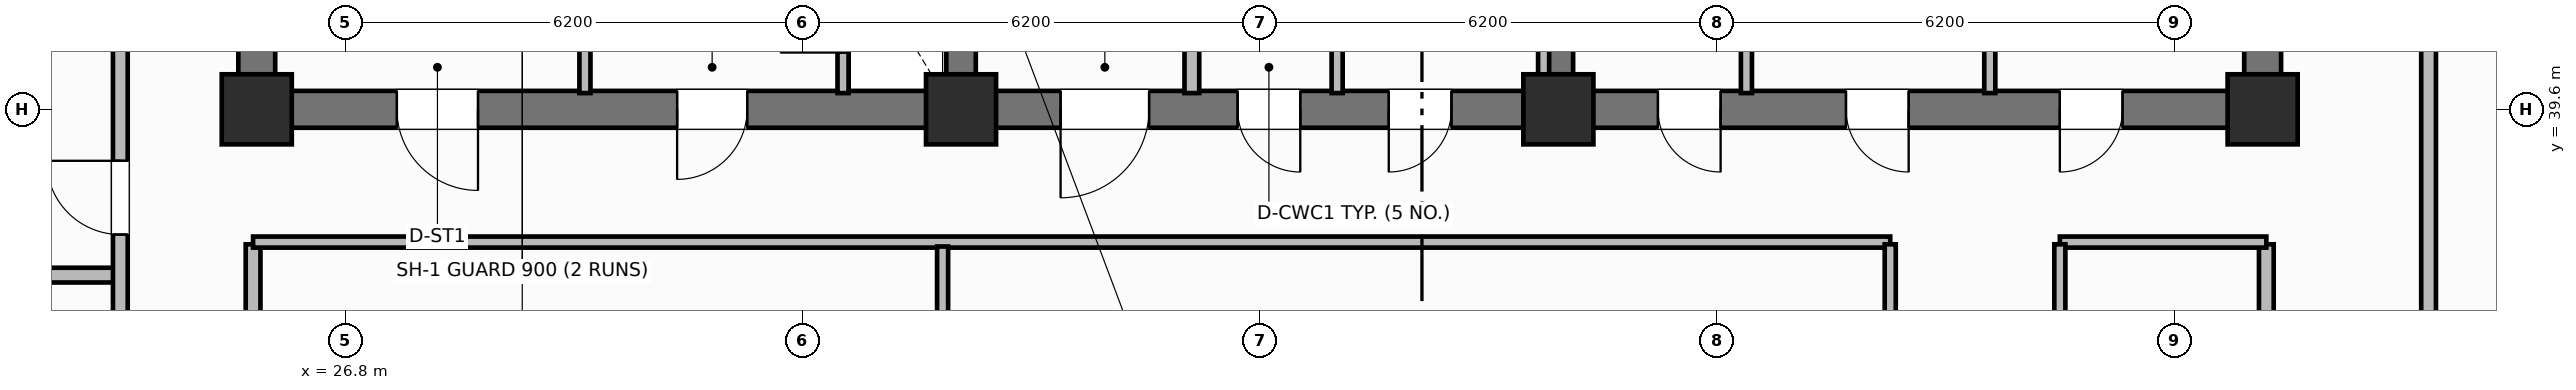
"""IFC4 building model, lengths in metres.
Left out: names, types, materials, properties, quantities, classifications, styles, units other than length and angle.
Written with IfcOpenShell. Run it as: python <this file> out.ifc"""

import sys

from ifc_helpers import new_model, si_unit, direction, frame, frame_2d, origin, origin_2d, place, context, subcontext, project, spatial, rectangle, extrude, element, fill, save


model = new_model("IFC4")
c1 = context("Model", 3, precision=1e-05, world=origin(), true_north=direction((0.0, 1.0)))
c2 = subcontext(c1, "Body", "Model", "MODEL_VIEW")
j1 = project(units=[si_unit("LENGTHUNIT", "METRE"), si_unit("PLANEANGLEUNIT", "RADIAN")], contexts=[c1])
p1 = place(None, origin())
s1 = spatial("IfcSite", under=j1, at=p1, CompositionType="ELEMENT")
p2 = place(p1, origin())
s2 = spatial("IfcBuilding", under=s1, at=p2, CompositionType="ELEMENT")
p3 = place(p2, frame((0.0, 0.0, 170.0)))
s3 = spatial("IfcBuildingStorey", under=s2, at=p3, CompositionType="ELEMENT", Elevation=170.0)
for number, where, z_axis, x_axis in (
    (1, (25.6, 39.85, 0.0), (0.0, 0.0, 1.0), (0.0, 1.0, 0.0)),
    (2, (52.8, 39.85, 0.0), (0.0, 0.0, 1.0), (0.0, 1.0, 0.0)),
):
    element("IfcWall", number, at=place(p3, frame(where, z_axis=z_axis, x_axis=x_axis)), inside=s3, PredefinedType="SHEAR", context=c2, shape_type="SweptSolid", body=[
        extrude(rectangle(XDim=5.7, YDim=0.5, at=frame_2d((2.85, 0.0))), origin(), (0.0, 0.0, 1.0), 3.7),
    ])
p4 = place(p3, frame((52.8, 39.6, 0.0), z_axis=(0.0, 0.0, 1.0), x_axis=(-1.0, 0.0, 0.0)))
e3 = element("IfcWall", 3, at=p4, inside=s3, PredefinedType="SHEAR", context=c2, shape_type="SweptSolid", body=[
    extrude(rectangle(XDim=27.2, YDim=0.5, at=frame_2d((13.6, 0.0))), origin(), (0.0, 0.0, 1.0), 3.7),
])
p5 = place(p4, frame((24.2, 0.0, 0.0)))
e4 = element("IfcOpeningElement", 4, at=p5, cuts=e3, PredefinedType="OPENING", context=c2, shape_type="SweptSolid", body=[
    extrude(rectangle(XDim=1.1, YDim=2.15, at=frame_2d((0.55, 1.075))), frame((0.0, 0.26, 0.0), z_axis=(0.0, -1.0, 0.0), x_axis=(1.0, 0.0, 0.0)), (0.0, 0.0, 1.0), 0.52),
])
p6 = place(p4, frame((20.55, 0.0, 0.0)))
e5 = element("IfcOpeningElement", 5, at=p6, cuts=e3, PredefinedType="OPENING", context=c2, shape_type="SweptSolid", body=[
    extrude(rectangle(XDim=0.95, YDim=2.1, at=frame_2d((0.475, 1.05))), frame((0.0, 0.26, 0.0), z_axis=(0.0, -1.0, 0.0), x_axis=(1.0, 0.0, 0.0)), (0.0, 0.0, 1.0), 0.52),
])
p7 = place(p4, frame((15.1, 0.0, 0.0)))
e6 = element("IfcOpeningElement", 6, at=p7, cuts=e3, PredefinedType="OPENING", context=c2, shape_type="SweptSolid", body=[
    extrude(rectangle(XDim=1.2, YDim=2.15, at=frame_2d((0.6, 1.075))), frame((0.0, 0.26, 0.0), z_axis=(0.0, -1.0, 0.0), x_axis=(1.0, 0.0, 0.0)), (0.0, 0.0, 1.0), 0.52),
])
p8 = place(p4, frame((13.05, 0.0, 0.0)))
e7 = element("IfcOpeningElement", 7, at=p8, cuts=e3, PredefinedType="OPENING", context=c2, shape_type="SweptSolid", body=[
    extrude(rectangle(XDim=0.85, YDim=2.1, at=frame_2d((0.425, 1.05))), frame((0.0, 0.26, 0.0), z_axis=(0.0, -1.0, 0.0), x_axis=(1.0, 0.0, 0.0)), (0.0, 0.0, 1.0), 0.52),
])
p9 = place(p4, frame((11.0, 0.0, 0.0)))
e8 = element("IfcOpeningElement", 8, at=p9, cuts=e3, PredefinedType="OPENING", context=c2, shape_type="SweptSolid", body=[
    extrude(rectangle(XDim=0.85, YDim=2.1, at=frame_2d((0.425, 1.05))), frame((0.0, 0.26, 0.0), z_axis=(0.0, -1.0, 0.0), x_axis=(1.0, 0.0, 0.0)), (0.0, 0.0, 1.0), 0.52),
])
p10 = place(p4, frame((7.35, 0.0, 0.0)))
e9 = element("IfcOpeningElement", 9, at=p10, cuts=e3, PredefinedType="OPENING", context=c2, shape_type="SweptSolid", body=[
    extrude(rectangle(XDim=0.85, YDim=2.1, at=frame_2d((0.425, 1.05))), frame((0.0, 0.26, 0.0), z_axis=(0.0, -1.0, 0.0), x_axis=(1.0, 0.0, 0.0)), (0.0, 0.0, 1.0), 0.52),
])
p11 = place(p4, frame((4.8, 0.0, 0.0)))
e10 = element("IfcOpeningElement", 10, at=p11, cuts=e3, PredefinedType="OPENING", context=c2, shape_type="SweptSolid", body=[
    extrude(rectangle(XDim=0.85, YDim=2.1, at=frame_2d((0.425, 1.05))), frame((0.0, 0.26, 0.0), z_axis=(0.0, -1.0, 0.0), x_axis=(1.0, 0.0, 0.0)), (0.0, 0.0, 1.0), 0.52),
])
p12 = place(p4, frame((1.9, 0.0, 0.0)))
e11 = element("IfcOpeningElement", 11, at=p12, cuts=e3, PredefinedType="OPENING", context=c2, shape_type="SweptSolid", body=[
    extrude(rectangle(XDim=0.85, YDim=2.1, at=frame_2d((0.425, 1.05))), frame((0.0, 0.26, 0.0), z_axis=(0.0, -1.0, 0.0), x_axis=(1.0, 0.0, 0.0)), (0.0, 0.0, 1.0), 0.52),
])
for number, where, z_axis, x_axis in (
    (12, (35.15, 39.85, 0.0), (0.0, 0.0, 1.0), (0.0, 1.0, 0.0)),
    (13, (43.25, 39.85, 0.0), (0.0, 0.0, 1.0), (0.0, 1.0, 0.0)),
):
    element("IfcWall", number, at=place(p3, frame(where, z_axis=z_axis, x_axis=x_axis)), inside=s3, PredefinedType="SHEAR", context=c2, shape_type="SweptSolid", body=[
        extrude(rectangle(XDim=5.7, YDim=0.4, at=frame_2d((2.85, 0.0))), origin(), (0.0, 0.0, 1.0), 3.7),
    ])
for number, where, z_axis, x_axis in (
    (14, (25.6, 39.6, 0.0), (0.0, 0.0, 1.0), (1.0, 0.0, 0.0)),
    (15, (35.15, 39.6, 0.0), (0.0, 0.0, 1.0), (1.0, 0.0, 0.0)),
    (16, (43.25, 39.6, 0.0), (0.0, 0.0, 1.0), (1.0, 0.0, 0.0)),
    (17, (52.8, 39.6, 0.0), (0.0, 0.0, 1.0), (1.0, 0.0, 0.0)),
):
    element("IfcColumn", number, at=place(p3, frame(where, z_axis=z_axis, x_axis=x_axis)), inside=s3, PredefinedType="COLUMN", context=c2, shape_type="SweptSolid", body=[
        extrude(rectangle(XDim=0.95, YDim=0.95, at=origin_2d()), origin(), (0.0, 0.0, 1.0), 3.7),
    ])
p13 = place(p3, frame((33.55, 39.82, 0.0), z_axis=(0.0, 0.0, 1.0), x_axis=(0.0, 1.0, 0.0)))
e18 = element("IfcWall", 18, at=p13, inside=s3, PredefinedType="PARTITIONING", context=c2, shape_type="SweptSolid", body=[
    extrude(rectangle(XDim=2.13, YDim=0.15, at=frame_2d((1.065, 0.0))), origin(), (0.0, 0.0, 1.0), 2.55),
])
p14 = place(p13, frame((0.55, 0.0, 0.0)))
e19 = element("IfcOpeningElement", 19, at=p14, cuts=e18, PredefinedType="OPENING", context=c2, shape_type="SweptSolid", body=[
    extrude(rectangle(XDim=0.85, YDim=2.05, at=frame_2d((0.425, 1.025))), frame((0.0, 0.085, 0.0), z_axis=(0.0, -1.0, 0.0), x_axis=(1.0, 0.0, 0.0)), (0.0, 0.0, 1.0), 0.17),
])
p15 = place(p3, frame((30.05, 39.82, 0.0), z_axis=(0.0, 0.0, 1.0), x_axis=(0.0, 1.0, 0.0)))
e20 = element("IfcWall", 20, at=p15, inside=s3, PredefinedType="PARTITIONING", context=c2, shape_type="SweptSolid", body=[
    extrude(rectangle(XDim=2.13, YDim=0.15, at=frame_2d((1.065, 0.0))), origin(), (0.0, 0.0, 1.0), 2.55),
])
p16 = place(p3, frame((38.28, 39.82, 0.0), z_axis=(0.0, 0.0, 1.0), x_axis=(0.0, 1.0, 0.0)))
e21 = element("IfcWall", 21, at=p16, inside=s3, PredefinedType="PARTITIONING", context=c2, shape_type="SweptSolid", body=[
    extrude(rectangle(XDim=5.63, YDim=0.2, at=frame_2d((2.815, 0.0))), origin(), (0.0, 0.0, 1.0), 2.55),
])
for number, where, z_axis, x_axis in (
    (22, (43.05, 39.82, 0.0), (0.0, 0.0, 1.0), (0.0, 1.0, 0.0)),
    (23, (40.25, 39.82, 0.0), (0.0, 0.0, 1.0), (0.0, 1.0, 0.0)),
    (24, (45.8, 39.82, 0.0), (0.0, 0.0, 1.0), (0.0, 1.0, 0.0)),
):
    element("IfcWall", number, at=place(p3, frame(where, z_axis=z_axis, x_axis=x_axis)), inside=s3, PredefinedType="PARTITIONING", context=c2, shape_type="SweptSolid", body=[
        extrude(rectangle(XDim=5.63, YDim=0.15, at=frame_2d((2.815, 0.0))), origin(), (0.0, 0.0, 1.0), 2.55),
    ])
p17 = place(p3, frame((49.1, 39.82, 0.0), z_axis=(0.0, 0.0, 1.0), x_axis=(0.0, 1.0, 0.0)))
e25 = element("IfcWall", 25, at=p17, inside=s3, PredefinedType="PARTITIONING", context=c2, shape_type="SweptSolid", body=[
    extrude(rectangle(XDim=2.73, YDim=0.15, at=frame_2d((1.365, 0.0))), origin(), (0.0, 0.0, 1.0), 2.55),
])
for number, where, z_axis, x_axis in (
    (26, (25.55, 18.63, 0.0), (0.0, 0.0, 1.0), (0.0, 1.0, 0.0)),
    (27, (52.85, 18.63, 0.0), (0.0, 0.0, 1.0), (0.0, 1.0, 0.0)),
):
    element("IfcWall", number, at=place(p3, frame(where, z_axis=z_axis, x_axis=x_axis)), inside=s3, PredefinedType="PARTITIONING", context=c2, shape_type="SweptSolid", body=[
        extrude(rectangle(XDim=19.14, YDim=0.2, at=frame_2d((9.57, 0.0))), origin(), (0.0, 0.0, 1.0), 2.55),
    ])
p18 = place(p3, frame((25.55, 37.8, 0.0), z_axis=(0.0, 0.0, 1.0), x_axis=(1.0, 0.0, 0.0)))
e28 = element("IfcWall", 28, at=p18, inside=s3, PredefinedType="PARTITIONING", context=c2, shape_type="SweptSolid", body=[
    extrude(rectangle(XDim=22.2, YDim=0.15, at=frame_2d((11.1, 0.0))), origin(), (0.0, 0.0, 1.0), 2.55),
])
p19 = place(p3, frame((50.05, 37.8, 0.0), z_axis=(0.0, 0.0, 1.0), x_axis=(1.0, 0.0, 0.0)))
e29 = element("IfcWall", 29, at=p19, inside=s3, PredefinedType="PARTITIONING", context=c2, shape_type="SweptSolid", body=[
    extrude(rectangle(XDim=2.8, YDim=0.15, at=frame_2d((1.4, 0.0))), origin(), (0.0, 0.0, 1.0), 2.55),
])
p20 = place(p3, frame((34.9, 18.66, 0.0), z_axis=(0.0, 0.0, 1.0), x_axis=(0.0, 1.0, 0.0)))
e30 = element("IfcWall", 30, at=p20, inside=s3, PredefinedType="PARTITIONING", context=c2, shape_type="SweptSolid", body=[
    extrude(rectangle(XDim=19.08, YDim=0.15, at=frame_2d((9.54, 0.0))), origin(), (0.0, 0.0, 1.0), 2.55),
])
p21 = place(p20, frame((5.0, 0.0, 0.0)))
e31 = element("IfcOpeningElement", 31, at=p21, cuts=e30, PredefinedType="OPENING", context=c2, shape_type="SweptSolid", body=[
    extrude(rectangle(XDim=1.0, YDim=2.15, at=frame_2d((0.5, 1.075))), frame((0.0, 0.085, 0.0), z_axis=(0.0, -1.0, 0.0), x_axis=(1.0, 0.0, 0.0)), (0.0, 0.0, 1.0), 0.17),
])
p22 = place(p3, frame((47.75, 18.63, 0.0), z_axis=(0.0, 0.0, 1.0), x_axis=(0.0, 1.0, 0.0)))
e32 = element("IfcWall", 32, at=p22, inside=s3, PredefinedType="PARTITIONING", context=c2, shape_type="SweptSolid", body=[
    extrude(rectangle(XDim=19.14, YDim=0.15, at=frame_2d((9.57, 0.0))), origin(), (0.0, 0.0, 1.0), 2.55),
])
p23 = place(p22, frame((2.4, 0.0, 0.0)))
e33 = element("IfcOpeningElement", 33, at=p23, cuts=e32, PredefinedType="OPENING", context=c2, shape_type="SweptSolid", body=[
    extrude(rectangle(XDim=0.9, YDim=2.1, at=frame_2d((0.45, 1.05))), frame((0.0, 0.085, 0.0), z_axis=(0.0, -1.0, 0.0), x_axis=(1.0, 0.0, 0.0)), (0.0, 0.0, 1.0), 0.17),
])
p24 = place(p22, frame((10.804, 0.0, 0.0)))
e34 = element("IfcOpeningElement", 34, at=p24, cuts=e32, PredefinedType="OPENING", context=c2, shape_type="SweptSolid", body=[
    extrude(rectangle(XDim=0.9, YDim=2.1, at=frame_2d((0.45, 1.05))), frame((0.0, 0.085, 0.0), z_axis=(0.0, -1.0, 0.0), x_axis=(1.0, 0.0, 0.0)), (0.0, 0.0, 1.0), 0.17),
])
p25 = place(p3, frame((50.05, 18.63, 0.0), z_axis=(0.0, 0.0, 1.0), x_axis=(0.0, 1.0, 0.0)))
e35 = element("IfcWall", 35, at=p25, inside=s3, PredefinedType="PARTITIONING", context=c2, shape_type="SweptSolid", body=[
    extrude(rectangle(XDim=19.14, YDim=0.15, at=frame_2d((9.57, 0.0))), origin(), (0.0, 0.0, 1.0), 2.55),
])
p26 = place(p25, frame((2.4, 0.0, 0.0)))
e36 = element("IfcOpeningElement", 36, at=p26, cuts=e35, PredefinedType="OPENING", context=c2, shape_type="SweptSolid", body=[
    extrude(rectangle(XDim=1.0, YDim=2.15, at=frame_2d((0.5, 1.075))), frame((0.0, 0.085, 0.0), z_axis=(0.0, -1.0, 0.0), x_axis=(1.0, 0.0, 0.0)), (0.0, 0.0, 1.0), 0.17),
])
p27 = place(p25, frame((10.804, 0.0, 0.0)))
e37 = element("IfcOpeningElement", 37, at=p27, cuts=e35, PredefinedType="OPENING", context=c2, shape_type="SweptSolid", body=[
    extrude(rectangle(XDim=1.0, YDim=2.15, at=frame_2d((0.5, 1.075))), frame((0.0, 0.085, 0.0), z_axis=(0.0, -1.0, 0.0), x_axis=(1.0, 0.0, 0.0)), (0.0, 0.0, 1.0), 0.17),
])
p28 = place(p3, frame((16.57, 37.352, 0.0), z_axis=(0.0, 0.0, 1.0), x_axis=(1.0, 0.0, 0.0)))
e38 = element("IfcWall", 38, at=p28, inside=s3, PredefinedType="PARTITIONING", context=c2, shape_type="SweptSolid", body=[
    extrude(rectangle(XDim=7.18, YDim=0.2, at=frame_2d((3.59, 0.0))), origin(), (0.0, 0.0, 1.0), 2.55),
])
p29 = place(p3, frame((23.75, 10.6, 0.0), z_axis=(0.0, 0.0, 1.0), x_axis=(0.0, 1.0, 0.0)))
e39 = element("IfcWall", 39, at=p29, inside=s3, PredefinedType="PARTITIONING", context=c2, shape_type="SweptSolid", body=[
    extrude(rectangle(XDim=35.2, YDim=0.2, at=frame_2d((17.6, 0.0))), origin(), (0.0, 0.0, 1.0), 2.55),
])
p30 = place(p29, frame((2.65, 0.0, 0.0)))
e40 = element("IfcOpeningElement", 40, at=p30, cuts=e39, PredefinedType="OPENING", context=c2, shape_type="SweptSolid", body=[
    extrude(rectangle(XDim=1.0, YDim=2.15, at=frame_2d((0.5, 1.075))), frame((0.0, 0.11, 0.0), z_axis=(0.0, -1.0, 0.0), x_axis=(1.0, 0.0, 0.0)), (0.0, 0.0, 1.0), 0.22),
])
p31 = place(p29, frame((11.4, 0.0, 0.0)))
e41 = element("IfcOpeningElement", 41, at=p31, cuts=e39, PredefinedType="OPENING", context=c2, shape_type="SweptSolid", body=[
    extrude(rectangle(XDim=1.0, YDim=2.15, at=frame_2d((0.5, 1.075))), frame((0.0, 0.11, 0.0), z_axis=(0.0, -1.0, 0.0), x_axis=(1.0, 0.0, 0.0)), (0.0, 0.0, 1.0), 0.22),
])
p32 = place(p29, frame((21.37, 0.0, 0.0)))
e42 = element("IfcOpeningElement", 42, at=p32, cuts=e39, PredefinedType="OPENING", context=c2, shape_type="SweptSolid", body=[
    extrude(rectangle(XDim=1.0, YDim=2.15, at=frame_2d((0.5, 1.075))), frame((0.0, 0.11, 0.0), z_axis=(0.0, -1.0, 0.0), x_axis=(1.0, 0.0, 0.0)), (0.0, 0.0, 1.0), 0.22),
])
p33 = place(p29, frame((27.302, 0.0, 0.0)))
e43 = element("IfcOpeningElement", 43, at=p33, cuts=e39, PredefinedType="OPENING", context=c2, shape_type="SweptSolid", body=[
    extrude(rectangle(XDim=1.0, YDim=2.15, at=frame_2d((0.5, 1.075))), frame((0.0, 0.11, 0.0), z_axis=(0.0, -1.0, 0.0), x_axis=(1.0, 0.0, 0.0)), (0.0, 0.0, 1.0), 0.22),
])
p34 = place(p3, frame((55.05, 10.6, 0.0), z_axis=(0.0, 0.0, 1.0), x_axis=(0.0, 1.0, 0.0)))
e44 = element("IfcWall", 44, at=p34, inside=s3, PredefinedType="PARTITIONING", context=c2, shape_type="SweptSolid", body=[
    extrude(rectangle(XDim=35.2, YDim=0.2, at=frame_2d((17.6, 0.0))), origin(), (0.0, 0.0, 1.0), 2.55),
])
p35 = place(p34, frame((2.65, 0.0, 0.0)))
e45 = element("IfcOpeningElement", 45, at=p35, cuts=e44, PredefinedType="OPENING", context=c2, shape_type="SweptSolid", body=[
    extrude(rectangle(XDim=1.0, YDim=2.15, at=frame_2d((0.5, 1.075))), frame((0.0, 0.11, 0.0), z_axis=(0.0, -1.0, 0.0), x_axis=(1.0, 0.0, 0.0)), (0.0, 0.0, 1.0), 0.22),
])
p36 = place(p34, frame((19.95, 0.0, 0.0)))
e46 = element("IfcOpeningElement", 46, at=p36, cuts=e44, PredefinedType="OPENING", context=c2, shape_type="SweptSolid", body=[
    extrude(rectangle(XDim=1.0, YDim=2.15, at=frame_2d((0.5, 1.075))), frame((0.0, 0.11, 0.0), z_axis=(0.0, -1.0, 0.0), x_axis=(1.0, 0.0, 0.0)), (0.0, 0.0, 1.0), 0.22),
])
p37 = place(p14, origin())
e47 = element("IfcDoor", 47, at=p37, inside=s3, OperationType="SINGLE_SWING_LEFT", PredefinedType="TRAPDOOR", context=c2, shape_type="SweptSolid", body=[
    extrude(rectangle(XDim=0.85, YDim=2.05, at=frame_2d((0.425, 1.025))), frame((0.0, 0.025, 0.0), z_axis=(0.0, -1.0, 0.0), x_axis=(1.0, 0.0, 0.0)), (0.0, 0.0, 1.0), 0.05),
])
fill(e19, e47)
p38 = place(p33, origin())
e48 = element("IfcDoor", 48, at=p38, inside=s3, OperationType="SINGLE_SWING_RIGHT", PredefinedType="DOOR", context=c2, shape_type="SweptSolid", body=[
    extrude(rectangle(XDim=1.0, YDim=2.15, at=frame_2d((0.5, 1.075))), frame((0.0, 0.025, 0.0), z_axis=(0.0, -1.0, 0.0), x_axis=(1.0, 0.0, 0.0)), (0.0, 0.0, 1.0), 0.05),
])
fill(e43, e48)
p39 = place(p5, origin())
e49 = element("IfcDoor", 49, at=p39, inside=s3, OperationType="SINGLE_SWING_LEFT", PredefinedType="DOOR", context=c2, shape_type="SweptSolid", body=[
    extrude(rectangle(XDim=1.1, YDim=2.15, at=frame_2d((0.55, 1.075))), frame((0.0, 0.025, 0.0), z_axis=(0.0, -1.0, 0.0), x_axis=(1.0, 0.0, 0.0)), (0.0, 0.0, 1.0), 0.05),
])
fill(e4, e49)
p40 = place(p6, origin())
e50 = element("IfcDoor", 50, at=p40, inside=s3, OperationType="SINGLE_SWING_RIGHT", PredefinedType="DOOR", context=c2, shape_type="SweptSolid", body=[
    extrude(rectangle(XDim=0.95, YDim=2.1, at=frame_2d((0.475, 1.05))), frame((0.0, 0.025, 0.0), z_axis=(0.0, -1.0, 0.0), x_axis=(1.0, 0.0, 0.0)), (0.0, 0.0, 1.0), 0.05),
])
fill(e5, e50)
p41 = place(p7, origin())
e51 = element("IfcDoor", 51, at=p41, inside=s3, OperationType="SINGLE_SWING_RIGHT", PredefinedType="DOOR", context=c2, shape_type="SweptSolid", body=[
    extrude(rectangle(XDim=1.2, YDim=2.15, at=frame_2d((0.6, 1.075))), frame((0.0, 0.025, 0.0), z_axis=(0.0, -1.0, 0.0), x_axis=(1.0, 0.0, 0.0)), (0.0, 0.0, 1.0), 0.05),
])
fill(e6, e51)
p42 = place(p8, origin())
e52 = element("IfcDoor", 52, at=p42, inside=s3, OperationType="SINGLE_SWING_LEFT", PredefinedType="DOOR", context=c2, shape_type="SweptSolid", body=[
    extrude(rectangle(XDim=0.85, YDim=2.1, at=frame_2d((0.425, 1.05))), frame((0.0, 0.025, 0.0), z_axis=(0.0, -1.0, 0.0), x_axis=(1.0, 0.0, 0.0)), (0.0, 0.0, 1.0), 0.05),
])
fill(e7, e52)
p43 = place(p9, origin())
e53 = element("IfcDoor", 53, at=p43, inside=s3, OperationType="SINGLE_SWING_RIGHT", PredefinedType="DOOR", context=c2, shape_type="SweptSolid", body=[
    extrude(rectangle(XDim=0.85, YDim=2.1, at=frame_2d((0.425, 1.05))), frame((0.0, 0.025, 0.0), z_axis=(0.0, -1.0, 0.0), x_axis=(1.0, 0.0, 0.0)), (0.0, 0.0, 1.0), 0.05),
])
fill(e8, e53)
p44 = place(p10, origin())
e54 = element("IfcDoor", 54, at=p44, inside=s3, OperationType="SINGLE_SWING_LEFT", PredefinedType="DOOR", context=c2, shape_type="SweptSolid", body=[
    extrude(rectangle(XDim=0.85, YDim=2.1, at=frame_2d((0.425, 1.05))), frame((0.0, 0.025, 0.0), z_axis=(0.0, -1.0, 0.0), x_axis=(1.0, 0.0, 0.0)), (0.0, 0.0, 1.0), 0.05),
])
fill(e9, e54)
p45 = place(p11, origin())
e55 = element("IfcDoor", 55, at=p45, inside=s3, OperationType="SINGLE_SWING_LEFT", PredefinedType="DOOR", context=c2, shape_type="SweptSolid", body=[
    extrude(rectangle(XDim=0.85, YDim=2.1, at=frame_2d((0.425, 1.05))), frame((0.0, 0.025, 0.0), z_axis=(0.0, -1.0, 0.0), x_axis=(1.0, 0.0, 0.0)), (0.0, 0.0, 1.0), 0.05),
])
fill(e10, e55)
p46 = place(p12, origin())
e56 = element("IfcDoor", 56, at=p46, inside=s3, OperationType="SINGLE_SWING_RIGHT", PredefinedType="DOOR", context=c2, shape_type="SweptSolid", body=[
    extrude(rectangle(XDim=0.85, YDim=2.1, at=frame_2d((0.425, 1.05))), frame((0.0, 0.025, 0.0), z_axis=(0.0, -1.0, 0.0), x_axis=(1.0, 0.0, 0.0)), (0.0, 0.0, 1.0), 0.05),
])
fill(e11, e56)
save(model, sys.argv[1])
